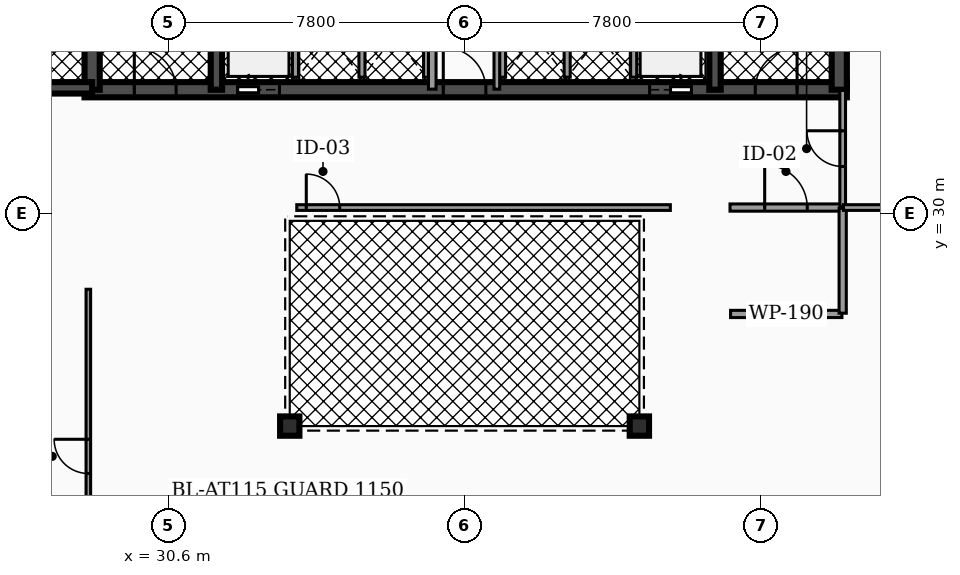
"""IFC4 building model, lengths in metres.
Left out: names, types, materials, properties, quantities, classifications, styles, units other than length and angle.
Written with IfcOpenShell. Run it as: python <this file> out.ifc"""

import sys

from ifc_helpers import new_model, si_unit, direction, frame, frame_2d, origin, origin_2d, place, context, subcontext, project, spatial, rectangle, hollow_circle, extrude, element, fill, save


model = new_model("IFC4")
c1 = context("Model", 3, precision=1e-05, world=origin(), true_north=direction((0.0, 1.0)))
c2 = subcontext(c1, "Body", "Model", "MODEL_VIEW")
j1 = project(units=[si_unit("LENGTHUNIT", "METRE"), si_unit("PLANEANGLEUNIT", "RADIAN")], contexts=[c1])
p1 = place(None, origin())
s1 = spatial("IfcSite", under=j1, at=p1, CompositionType="ELEMENT")
p2 = place(p1, origin())
s2 = spatial("IfcBuilding", under=s1, at=p2, CompositionType="ELEMENT")
p3 = place(p2, frame((0.0, 0.0, 31.62)))
s3 = spatial("IfcBuildingStorey", under=s2, at=p3, CompositionType="ELEMENT", Elevation=31.62)
p4 = place(p3, frame((28.4, 33.25, 0.0), z_axis=(0.0, 0.0, 1.0), x_axis=(1.0, 0.0, 0.0)))
e1 = element("IfcWall", 1, at=p4, inside=s3, PredefinedType="SHEAR", context=c2, shape_type="SweptSolid", body=[
    extrude(rectangle(XDim=20.06, YDim=0.4, at=frame_2d((10.03, 0.0))), origin(), (0.0, 0.0, 1.0), 3.82),
])
p5 = place(p4, frame((4.03, 0.0, 0.0)))
e2 = element("IfcOpeningElement", 2, at=p5, cuts=e1, PredefinedType="OPENING", context=c2, shape_type="SweptSolid", body=[
    extrude(rectangle(XDim=1.1, YDim=2.15, at=frame_2d((0.55, 1.075))), frame((0.0, 0.21, 0.0), z_axis=(0.0, -1.0, 0.0), x_axis=(1.0, 0.0, 0.0)), (0.0, 0.0, 1.0), 0.42),
])
p6 = place(p4, frame((14.87, 0.0, 0.0)))
e3 = element("IfcOpeningElement", 3, at=p6, cuts=e1, PredefinedType="OPENING", context=c2, shape_type="SweptSolid", body=[
    extrude(rectangle(XDim=1.1, YDim=2.15, at=frame_2d((0.55, 1.075))), frame((0.0, 0.21, 0.0), z_axis=(0.0, -1.0, 0.0), x_axis=(1.0, 0.0, 0.0)), (0.0, 0.0, 1.0), 0.42),
])
p7 = place(p4, frame((1.31, 0.0, 0.0)))
e4 = element("IfcOpeningElement", 4, at=p7, cuts=e1, PredefinedType="OPENING", context=c2, shape_type="SweptSolid", body=[
    extrude(rectangle(XDim=1.1, YDim=2.2, at=frame_2d((0.55, 1.1))), frame((0.0, 0.21, 0.0), z_axis=(0.0, -1.0, 0.0), x_axis=(1.0, 0.0, 0.0)), (0.0, 0.0, 1.0), 0.42),
])
p8 = place(p4, frame((9.44, 0.0, 0.0)))
e5 = element("IfcOpeningElement", 5, at=p8, cuts=e1, PredefinedType="OPENING", context=c2, shape_type="SweptSolid", body=[
    extrude(rectangle(XDim=1.12, YDim=2.05, at=frame_2d((0.56, 1.025))), frame((0.0, 0.21, 0.0), z_axis=(0.0, -1.0, 0.0), x_axis=(1.0, 0.0, 0.0)), (0.0, 0.0, 1.0), 0.42),
])
p9 = place(p4, frame((17.65, 0.0, 0.0)))
e6 = element("IfcOpeningElement", 6, at=p9, cuts=e1, PredefinedType="OPENING", context=c2, shape_type="SweptSolid", body=[
    extrude(rectangle(XDim=1.1, YDim=2.2, at=frame_2d((0.55, 1.1))), frame((0.0, 0.21, 0.0), z_axis=(0.0, -1.0, 0.0), x_axis=(1.0, 0.0, 0.0)), (0.0, 0.0, 1.0), 0.42),
])
p10 = place(p3, frame((28.6, 33.25, 0.0), z_axis=(0.0, 0.0, 1.0), x_axis=(0.0, 1.0, 0.0)))
e7 = element("IfcWall", 7, at=p10, inside=s3, PredefinedType="SHEAR", context=c2, shape_type="SweptSolid", body=[
    extrude(rectangle(XDim=10.2, YDim=0.4, at=frame_2d((5.1, 0.0))), origin(), (0.0, 0.0, 1.0), 3.82),
])
for number, where, z_axis, x_axis in (
    (8, (31.87, 33.25, 0.0), (0.0, 0.0, 1.0), (0.0, 1.0, 0.0)),
    (9, (44.99, 33.25, 0.0), (0.0, 0.0, 1.0), (0.0, 1.0, 0.0)),
):
    element("IfcWall", number, at=place(p3, frame(where, z_axis=z_axis, x_axis=x_axis)), inside=s3, PredefinedType="SHEAR", context=c2, shape_type="SweptSolid", body=[
        extrude(rectangle(XDim=10.2, YDim=0.3, at=frame_2d((5.1, 0.0))), origin(), (0.0, 0.0, 1.0), 3.82),
    ])
p11 = place(p3, frame((48.26, 33.25, 0.0), z_axis=(0.0, 0.0, 1.0), x_axis=(0.0, 1.0, 0.0)))
e10 = element("IfcWall", 10, at=p11, inside=s3, PredefinedType="SHEAR", context=c2, shape_type="SweptSolid", body=[
    extrude(rectangle(XDim=10.2, YDim=0.4, at=frame_2d((5.1, 0.0))), origin(), (0.0, 0.0, 1.0), 3.82),
])
p12 = place(p3, frame((25.08, 33.3, 0.0), z_axis=(0.0, 0.0, 1.0), x_axis=(1.0, 0.0, 0.0)))
e11 = element("IfcWall", 11, at=p12, inside=s3, PredefinedType="SHEAR", context=c2, shape_type="SweptSolid", body=[
    extrude(rectangle(XDim=3.52, YDim=0.3, at=frame_2d((1.76, 0.0))), origin(), (0.0, 0.0, 1.0), 3.82),
])
p13 = place(p12, frame((1.335, 0.0, 0.0)))
e12 = element("IfcOpeningElement", 12, at=p13, cuts=e11, PredefinedType="OPENING", context=c2, shape_type="SweptSolid", body=[
    extrude(rectangle(XDim=0.95, YDim=2.2, at=frame_2d((0.475, 1.1))), frame((0.0, 0.16, 0.0), z_axis=(0.0, -1.0, 0.0), x_axis=(1.0, 0.0, 0.0)), (0.0, 0.0, 1.0), 0.32),
])
for number, where, z_axis, x_axis in (
    (13, (33.8, 24.4, 0.0), (0.0, 0.0, 1.0), (1.0, 0.0, 0.0)),
    (14, (43.0, 24.4, 0.0), (0.0, 0.0, 1.0), (1.0, 0.0, 0.0)),
):
    element("IfcColumn", number, at=place(p3, frame(where, z_axis=z_axis, x_axis=x_axis)), inside=s3, PredefinedType="COLUMN", context=c2, shape_type="SweptSolid", body=[
        extrude(hollow_circle(Radius=0.254, WallThickness=0.02, at=origin_2d()), origin(), (0.0, 0.0, 1.0), 3.82),
    ])
for number, where, z_axis, x_axis in (
    (15, (33.95, 33.58, 0.0), (0.0, 0.0, 1.0), (0.0, 1.0, 0.0)),
    (16, (42.85, 33.58, 0.0), (0.0, 0.0, 1.0), (0.0, 1.0, 0.0)),
):
    element("IfcWall", number, at=place(p3, frame(where, z_axis=z_axis, x_axis=x_axis)), inside=s3, PredefinedType="SOLIDWALL", context=c2, shape_type="SweptSolid", body=[
        extrude(rectangle(XDim=2.45, YDim=0.16, at=frame_2d((1.225, 0.0))), origin(), (0.0, 0.0, 1.0), 2.792),
    ])
for number, where, z_axis, x_axis in (
    (17, (35.7, 33.58, 0.0), (0.0, 0.0, 1.0), (0.0, 1.0, 0.0)),
    (18, (37.4, 33.58, 0.0), (0.0, 0.0, 1.0), (0.0, 1.0, 0.0)),
    (19, (39.4, 33.58, 0.0), (0.0, 0.0, 1.0), (0.0, 1.0, 0.0)),
    (20, (41.1, 33.58, 0.0), (0.0, 0.0, 1.0), (0.0, 1.0, 0.0)),
):
    element("IfcWall", number, at=place(p3, frame(where, z_axis=z_axis, x_axis=x_axis)), inside=s3, PredefinedType="SOLIDWALL", context=c2, shape_type="SweptSolid", body=[
        extrude(rectangle(XDim=2.25, YDim=0.16, at=frame_2d((1.125, 0.0))), origin(), (0.0, 0.0, 1.0), 2.792),
    ])
p14 = place(p3, frame((37.55, 33.265, 0.0), z_axis=(0.0, 0.0, 1.0), x_axis=(0.0, 1.0, 0.0)))
e21 = element("IfcWall", 21, at=p14, inside=s3, PredefinedType="PARTITIONING", context=c2, shape_type="SweptSolid", body=[
    extrude(rectangle(XDim=4.595, YDim=0.2, at=frame_2d((2.298, 0.0))), origin(), (0.0, 0.0, 1.0), 2.777),
])
p15 = place(p14, frame((3.058, 0.0, 0.0)))
e22 = element("IfcOpeningElement", 22, at=p15, cuts=e21, PredefinedType="OPENING", context=c2, shape_type="SweptSolid", body=[
    extrude(rectangle(XDim=0.88, YDim=2.05, at=frame_2d((0.44, 1.025))), frame((0.0, 0.11, 0.0), z_axis=(0.0, -1.0, 0.0), x_axis=(1.0, 0.0, 0.0)), (0.0, 0.0, 1.0), 0.22),
])
p16 = place(p3, frame((39.25, 33.265, 0.0), z_axis=(0.0, 0.0, 1.0), x_axis=(0.0, 1.0, 0.0)))
e23 = element("IfcWall", 23, at=p16, inside=s3, PredefinedType="PARTITIONING", context=c2, shape_type="SweptSolid", body=[
    extrude(rectangle(XDim=4.595, YDim=0.15, at=frame_2d((2.298, 0.0))), origin(), (0.0, 0.0, 1.0), 2.777),
])
p17 = place(p16, frame((3.028, 0.0, 0.0)))
e24 = element("IfcOpeningElement", 24, at=p17, cuts=e23, PredefinedType="OPENING", context=c2, shape_type="SweptSolid", body=[
    extrude(rectangle(XDim=0.94, YDim=2.05, at=frame_2d((0.47, 1.025))), frame((0.0, 0.085, 0.0), z_axis=(0.0, -1.0, 0.0), x_axis=(1.0, 0.0, 0.0)), (0.0, 0.0, 1.0), 0.17),
])
p18 = place(p3, frame((45.385, 30.15, 0.0), z_axis=(0.0, 0.0, 1.0), x_axis=(1.0, 0.0, 0.0)))
e25 = element("IfcWall", 25, at=p18, inside=s3, PredefinedType="PARTITIONING", context=c2, shape_type="SweptSolid", body=[
    extrude(rectangle(XDim=2.945, YDim=0.19, at=frame_2d((1.473, 0.0))), origin(), (0.0, 0.0, 1.0), 2.777),
])
p19 = place(p18, frame((0.913, 0.0, 0.0)))
e26 = element("IfcOpeningElement", 26, at=p19, cuts=e25, PredefinedType="OPENING", context=c2, shape_type="SweptSolid", body=[
    extrude(rectangle(XDim=1.12, YDim=2.05, at=frame_2d((0.56, 1.025))), frame((0.0, 0.105, 0.0), z_axis=(0.0, -1.0, 0.0), x_axis=(1.0, 0.0, 0.0)), (0.0, 0.0, 1.0), 0.21),
])
p20 = place(p3, frame((48.35, 30.17, 0.0), z_axis=(0.0, 0.0, 1.0), x_axis=(0.0, 1.0, 0.0)))
e27 = element("IfcWall", 27, at=p20, inside=s3, PredefinedType="PARTITIONING", context=c2, shape_type="SweptSolid", body=[
    extrude(rectangle(XDim=3.06, YDim=0.15, at=frame_2d((1.53, 0.0))), origin(), (0.0, 0.0, 1.0), 2.777),
])
p21 = place(p20, frame((1.06, 0.0, 0.0)))
e28 = element("IfcOpeningElement", 28, at=p21, cuts=e27, PredefinedType="OPENING", context=c2, shape_type="SweptSolid", body=[
    extrude(rectangle(XDim=0.94, YDim=2.05, at=frame_2d((0.47, 1.025))), frame((0.0, 0.085, 0.0), z_axis=(0.0, -1.0, 0.0), x_axis=(1.0, 0.0, 0.0)), (0.0, 0.0, 1.0), 0.17),
])
p22 = place(p3, frame((33.985, 30.15, 0.0), z_axis=(0.0, 0.0, 1.0), x_axis=(1.0, 0.0, 0.0)))
e29 = element("IfcWall", 29, at=p22, inside=s3, PredefinedType="PARTITIONING", context=c2, shape_type="SweptSolid", body=[
    extrude(rectangle(XDim=9.83, YDim=0.15, at=frame_2d((4.915, 0.0))), origin(), (0.0, 0.0, 1.0), 2.777),
])
p23 = place(p22, frame((0.25, 0.0, 0.0)))
e30 = element("IfcOpeningElement", 30, at=p23, cuts=e29, PredefinedType="OPENING", context=c2, shape_type="SweptSolid", body=[
    extrude(rectangle(XDim=0.88, YDim=2.05, at=frame_2d((0.44, 1.025))), frame((0.0, 0.085, 0.0), z_axis=(0.0, -1.0, 0.0), x_axis=(1.0, 0.0, 0.0)), (0.0, 0.0, 1.0), 0.17),
])
p24 = place(p3, frame((45.4, 27.35, 0.0), z_axis=(0.0, 0.0, 1.0), x_axis=(1.0, 0.0, 0.0)))
e31 = element("IfcWall", 31, at=p24, inside=s3, PredefinedType="PARTITIONING", context=c2, shape_type="SweptSolid", body=[
    extrude(rectangle(XDim=2.93, YDim=0.19, at=frame_2d((1.465, 0.0))), origin(), (0.0, 0.0, 1.0), 2.777),
])
p25 = place(p3, frame((48.35, 27.37, 0.0), z_axis=(0.0, 0.0, 1.0), x_axis=(0.0, 1.0, 0.0)))
e32 = element("IfcWall", 32, at=p25, inside=s3, PredefinedType="PARTITIONING", context=c2, shape_type="SweptSolid", body=[
    extrude(rectangle(XDim=2.76, YDim=0.19, at=frame_2d((1.38, 0.0))), origin(), (0.0, 0.0, 1.0), 2.777),
])
p26 = place(p3, frame((48.37, 30.15, 0.0), z_axis=(0.0, 0.0, 1.0), x_axis=(1.0, 0.0, 0.0)))
e33 = element("IfcWall", 33, at=p26, inside=s3, PredefinedType="PARTITIONING", context=c2, shape_type="SweptSolid", body=[
    extrude(rectangle(XDim=2.06, YDim=0.15, at=frame_2d((1.03, 0.0))), origin(), (0.0, 0.0, 1.0), 2.777),
])
p27 = place(p3, frame((28.5, 19.205, 0.0), z_axis=(0.0, 0.0, 1.0), x_axis=(0.0, 1.0, 0.0)))
e34 = element("IfcWall", 34, at=p27, inside=s3, PredefinedType="PARTITIONING", context=c2, shape_type="SweptSolid", body=[
    extrude(rectangle(XDim=8.795, YDim=0.12, at=frame_2d((4.397, 0.0))), origin(), (0.0, 0.0, 1.0), 2.777),
])
p28 = place(p27, frame((3.947, 0.0, 0.0)))
e35 = element("IfcOpeningElement", 35, at=p28, cuts=e34, PredefinedType="OPENING", context=c2, shape_type="SweptSolid", body=[
    extrude(rectangle(XDim=0.9, YDim=2.05, at=frame_2d((0.45, 1.025))), frame((0.0, 0.07, 0.0), z_axis=(0.0, -1.0, 0.0), x_axis=(1.0, 0.0, 0.0)), (0.0, 0.0, 1.0), 0.14),
])
p29 = place(p5, origin())
e36 = element("IfcDoor", 36, at=p29, inside=s3, OperationType="SLIDING_TO_LEFT", PredefinedType="DOOR", context=c2, shape_type="SweptSolid", body=[
    extrude(rectangle(XDim=1.1, YDim=2.15, at=frame_2d((0.55, 1.075))), frame((0.0, 0.025, 0.0), z_axis=(0.0, -1.0, 0.0), x_axis=(1.0, 0.0, 0.0)), (0.0, 0.0, 1.0), 0.05),
])
fill(e2, e36)
p30 = place(p6, origin())
e37 = element("IfcDoor", 37, at=p30, inside=s3, OperationType="SLIDING_TO_RIGHT", PredefinedType="DOOR", context=c2, shape_type="SweptSolid", body=[
    extrude(rectangle(XDim=1.1, YDim=2.15, at=frame_2d((0.55, 1.075))), frame((0.0, 0.025, 0.0), z_axis=(0.0, -1.0, 0.0), x_axis=(1.0, 0.0, 0.0)), (0.0, 0.0, 1.0), 0.05),
])
fill(e3, e37)
p31 = place(p7, origin())
e38 = element("IfcDoor", 38, at=p31, inside=s3, OperationType="SINGLE_SWING_LEFT", PredefinedType="DOOR", context=c2, shape_type="SweptSolid", body=[
    extrude(rectangle(XDim=1.1, YDim=2.2, at=frame_2d((0.55, 1.1))), frame((0.0, 0.025, 0.0), z_axis=(0.0, -1.0, 0.0), x_axis=(1.0, 0.0, 0.0)), (0.0, 0.0, 1.0), 0.05),
])
fill(e4, e38)
p32 = place(p8, origin())
e39 = element("IfcDoor", 39, at=p32, inside=s3, OperationType="SINGLE_SWING_LEFT", PredefinedType="DOOR", context=c2, shape_type="SweptSolid", body=[
    extrude(rectangle(XDim=1.12, YDim=2.05, at=frame_2d((0.56, 1.025))), frame((0.0, 0.025, 0.0), z_axis=(0.0, -1.0, 0.0), x_axis=(1.0, 0.0, 0.0)), (0.0, 0.0, 1.0), 0.05),
])
fill(e5, e39)
p33 = place(p9, origin())
e40 = element("IfcDoor", 40, at=p33, inside=s3, OperationType="SINGLE_SWING_RIGHT", PredefinedType="DOOR", context=c2, shape_type="SweptSolid", body=[
    extrude(rectangle(XDim=1.1, YDim=2.2, at=frame_2d((0.55, 1.1))), frame((0.0, 0.025, 0.0), z_axis=(0.0, -1.0, 0.0), x_axis=(1.0, 0.0, 0.0)), (0.0, 0.0, 1.0), 0.05),
])
fill(e6, e40)
p34 = place(p19, origin())
e41 = element("IfcDoor", 41, at=p34, inside=s3, OperationType="SINGLE_SWING_LEFT", PredefinedType="DOOR", context=c2, shape_type="SweptSolid", body=[
    extrude(rectangle(XDim=1.12, YDim=2.05, at=frame_2d((0.56, 1.025))), frame((0.0, 0.025, 0.0), z_axis=(0.0, -1.0, 0.0), x_axis=(1.0, 0.0, 0.0)), (0.0, 0.0, 1.0), 0.05),
])
fill(e26, e41)
p35 = place(p21, origin())
e42 = element("IfcDoor", 42, at=p35, inside=s3, OperationType="SINGLE_SWING_RIGHT", PredefinedType="DOOR", context=c2, shape_type="SweptSolid", body=[
    extrude(rectangle(XDim=0.94, YDim=2.05, at=frame_2d((0.47, 1.025))), frame((0.0, 0.025, 0.0), z_axis=(0.0, -1.0, 0.0), x_axis=(1.0, 0.0, 0.0)), (0.0, 0.0, 1.0), 0.05),
])
fill(e28, e42)
p36 = place(p23, origin())
e43 = element("IfcDoor", 43, at=p36, inside=s3, OperationType="SINGLE_SWING_LEFT", PredefinedType="DOOR", context=c2, shape_type="SweptSolid", body=[
    extrude(rectangle(XDim=0.88, YDim=2.05, at=frame_2d((0.44, 1.025))), frame((0.0, 0.025, 0.0), z_axis=(0.0, -1.0, 0.0), x_axis=(1.0, 0.0, 0.0)), (0.0, 0.0, 1.0), 0.05),
])
fill(e30, e43)
p37 = place(p28, origin())
e44 = element("IfcDoor", 44, at=p37, inside=s3, OperationType="SINGLE_SWING_RIGHT", PredefinedType="DOOR", context=c2, shape_type="SweptSolid", body=[
    extrude(rectangle(XDim=0.9, YDim=2.05, at=frame_2d((0.45, 1.025))), frame((0.0, 0.025, 0.0), z_axis=(0.0, -1.0, 0.0), x_axis=(1.0, 0.0, 0.0)), (0.0, 0.0, 1.0), 0.05),
])
fill(e35, e44)
save(model, sys.argv[1])
